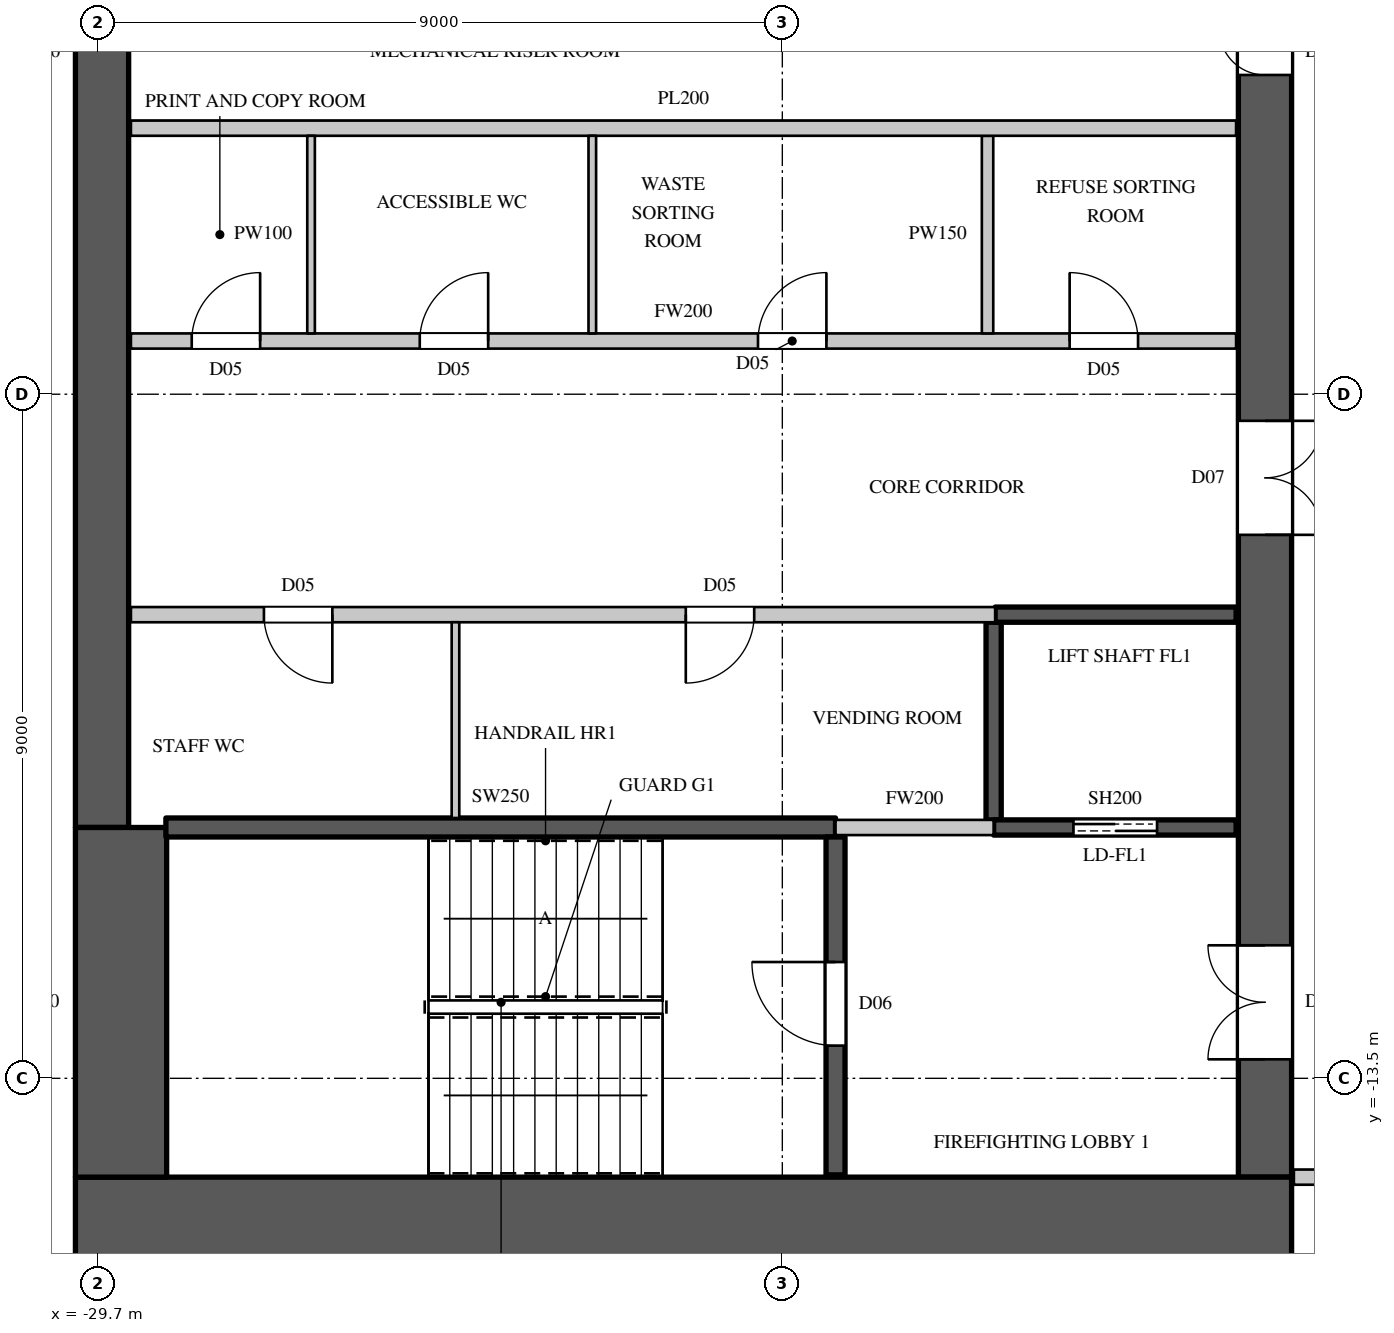
"""IFC4 building model, lengths in metres.
Left out: names, types, materials, properties, quantities, classifications, styles, units other than length and angle.
Written with IfcOpenShell. Run it as: python <this file> out.ifc"""

import sys

from ifc_helpers import new_model, si_unit, direction, frame, frame_2d, origin, place, context, subcontext, project, spatial, rectangle, extrude, element, fill, save


model = new_model("IFC4")
c1 = context("Model", 3, precision=1e-05, world=origin(), true_north=direction((0.0, 1.0)))
c2 = subcontext(c1, "Body", "Model", "MODEL_VIEW")
j1 = project(units=[si_unit("LENGTHUNIT", "METRE"), si_unit("PLANEANGLEUNIT", "RADIAN")], contexts=[c1])
p1 = place(None, origin())
s1 = spatial("IfcSite", under=j1, at=p1, CompositionType="ELEMENT")
p2 = place(p1, origin())
s2 = spatial("IfcBuilding", under=s1, at=p2, CompositionType="ELEMENT")
p3 = place(p2, frame((0.0, 0.0, 276.2)))
s3 = spatial("IfcBuildingStorey", under=s2, at=p3, CompositionType="ELEMENT", Elevation=276.2)
p4 = place(p3, frame((-30.0, -15.4, 0.0), z_axis=(0.0, 0.0, 1.0), x_axis=(1.0, 0.0, 0.0)))
e1 = element("IfcWall", 1, at=p4, inside=s3, PredefinedType="SHEAR", context=c2, shape_type="SweptSolid", body=[
    extrude(rectangle(XDim=16.0, YDim=1.2, at=frame_2d((8.0, 0.0))), origin(), (0.0, 0.0, 1.0), 4.1),
])
p5 = place(p3, frame((-14.35, -14.8, 0.0), z_axis=(0.0, 0.0, 1.0), x_axis=(0.0, 1.0, 0.0)))
e2 = element("IfcWall", 2, at=p5, inside=s3, PredefinedType="SHEAR", context=c2, shape_type="SweptSolid", body=[
    extrude(rectangle(XDim=29.6, YDim=0.7, at=frame_2d((14.8, 0.0))), origin(), (0.0, 0.0, 1.0), 4.1),
])
p6 = place(p5, frame((1.55, 0.0, 0.0)))
e3 = element("IfcOpeningElement", 3, at=p6, cuts=e2, PredefinedType="OPENING", context=c2, shape_type="SweptSolid", body=[
    extrude(rectangle(XDim=1.5, YDim=2.4, at=frame_2d((0.75, 1.2))), frame((0.0, 0.36, 0.0), z_axis=(0.0, -1.0, 0.0), x_axis=(1.0, 0.0, 0.0)), (0.0, 0.0, 1.0), 0.72),
])
p7 = place(p5, frame((26.55, 0.0, 0.0)))
e4 = element("IfcOpeningElement", 4, at=p7, cuts=e2, PredefinedType="OPENING", context=c2, shape_type="SweptSolid", body=[
    extrude(rectangle(XDim=1.5, YDim=2.4, at=frame_2d((0.75, 1.2))), frame((0.0, 0.36, 0.0), z_axis=(0.0, -1.0, 0.0), x_axis=(1.0, 0.0, 0.0)), (0.0, 0.0, 1.0), 0.72),
])
p8 = place(p5, frame((8.45, 0.0, 0.0)))
e5 = element("IfcOpeningElement", 5, at=p8, cuts=e2, PredefinedType="OPENING", context=c2, shape_type="SweptSolid", body=[
    extrude(rectangle(XDim=1.5, YDim=2.4, at=frame_2d((0.75, 1.2))), frame((0.0, 0.36, 0.0), z_axis=(0.0, -1.0, 0.0), x_axis=(1.0, 0.0, 0.0)), (0.0, 0.0, 1.0), 0.72),
])
p9 = place(p5, frame((19.65, 0.0, 0.0)))
e6 = element("IfcOpeningElement", 6, at=p9, cuts=e2, PredefinedType="OPENING", context=c2, shape_type="SweptSolid", body=[
    extrude(rectangle(XDim=1.5, YDim=2.4, at=frame_2d((0.75, 1.2))), frame((0.0, 0.36, 0.0), z_axis=(0.0, -1.0, 0.0), x_axis=(1.0, 0.0, 0.0)), (0.0, 0.0, 1.0), 0.72),
])
p10 = place(p5, frame((14.5, 0.0, 0.0)))
e7 = element("IfcOpeningElement", 7, at=p10, cuts=e2, PredefinedType="OPENING", context=c2, shape_type="SweptSolid", body=[
    extrude(rectangle(XDim=0.6, YDim=2.0, at=frame_2d((0.3, 1.0))), frame((0.0, 0.36, 0.0), z_axis=(0.0, -1.0, 0.0), x_axis=(1.0, 0.0, 0.0)), (0.0, 0.0, 1.0), 0.72),
])
p11 = place(p3, frame((-29.65, -10.2, 0.0), z_axis=(0.0, 0.0, 1.0), x_axis=(0.0, 1.0, 0.0)))
e8 = element("IfcWall", 8, at=p11, inside=s3, PredefinedType="SHEAR", context=c2, shape_type="SweptSolid", body=[
    extrude(rectangle(XDim=20.4, YDim=0.7, at=frame_2d((10.2, 0.0))), origin(), (0.0, 0.0, 1.0), 4.1),
])
p12 = place(p3, frame((-29.4, -14.8, 0.0), z_axis=(0.0, 0.0, 1.0), x_axis=(0.0, 1.0, 0.0)))
e9 = element("IfcWall", 9, at=p12, inside=s3, PredefinedType="SHEAR", context=c2, shape_type="SweptSolid", body=[
    extrude(rectangle(XDim=4.6, YDim=1.2, at=frame_2d((2.3, 0.0))), origin(), (0.0, 0.0, 1.0), 4.1),
])
p13 = place(p3, frame((-29.27, -7.4, 0.0), z_axis=(0.0, 0.0, 1.0), x_axis=(1.0, 0.0, 0.0)))
e10 = element("IfcWall", 10, at=p13, inside=s3, PredefinedType="PARTITIONING", context=c2, shape_type="SweptSolid", body=[
    extrude(rectangle(XDim=11.37, YDim=0.2, at=frame_2d((5.685, 0.0))), origin(), (0.0, 0.0, 1.0), 3.8),
])
p14 = place(p13, frame((1.75, 0.0, 0.0)))
e11 = element("IfcOpeningElement", 11, at=p14, cuts=e10, PredefinedType="OPENING", context=c2, shape_type="SweptSolid", body=[
    extrude(rectangle(XDim=0.9, YDim=2.2, at=frame_2d((0.45, 1.1))), frame((0.0, 0.11, 0.0), z_axis=(0.0, -1.0, 0.0), x_axis=(1.0, 0.0, 0.0)), (0.0, 0.0, 1.0), 0.22),
])
p15 = place(p13, frame((7.3, 0.0, 0.0)))
e12 = element("IfcOpeningElement", 12, at=p15, cuts=e10, PredefinedType="OPENING", context=c2, shape_type="SweptSolid", body=[
    extrude(rectangle(XDim=0.9, YDim=2.2, at=frame_2d((0.45, 1.1))), frame((0.0, 0.11, 0.0), z_axis=(0.0, -1.0, 0.0), x_axis=(1.0, 0.0, 0.0)), (0.0, 0.0, 1.0), 0.22),
])
p16 = place(p3, frame((-29.27, -3.8, 0.0), z_axis=(0.0, 0.0, 1.0), x_axis=(1.0, 0.0, 0.0)))
e13 = element("IfcWall", 13, at=p16, inside=s3, PredefinedType="PARTITIONING", context=c2, shape_type="SweptSolid", body=[
    extrude(rectangle(XDim=14.54, YDim=0.2, at=frame_2d((7.27, 0.0))), origin(), (0.0, 0.0, 1.0), 3.8),
])
p17 = place(p16, frame((0.8, 0.0, 0.0)))
e14 = element("IfcOpeningElement", 14, at=p17, cuts=e13, PredefinedType="OPENING", context=c2, shape_type="SweptSolid", body=[
    extrude(rectangle(XDim=0.9, YDim=2.2, at=frame_2d((0.45, 1.1))), frame((0.0, 0.11, 0.0), z_axis=(0.0, -1.0, 0.0), x_axis=(1.0, 0.0, 0.0)), (0.0, 0.0, 1.0), 0.22),
])
p18 = place(p16, frame((3.8, 0.0, 0.0)))
e15 = element("IfcOpeningElement", 15, at=p18, cuts=e13, PredefinedType="OPENING", context=c2, shape_type="SweptSolid", body=[
    extrude(rectangle(XDim=0.9, YDim=2.2, at=frame_2d((0.45, 1.1))), frame((0.0, 0.11, 0.0), z_axis=(0.0, -1.0, 0.0), x_axis=(1.0, 0.0, 0.0)), (0.0, 0.0, 1.0), 0.22),
])
p19 = place(p16, frame((8.25, 0.0, 0.0)))
e16 = element("IfcOpeningElement", 16, at=p19, cuts=e13, PredefinedType="OPENING", context=c2, shape_type="SweptSolid", body=[
    extrude(rectangle(XDim=0.9, YDim=2.2, at=frame_2d((0.45, 1.1))), frame((0.0, 0.11, 0.0), z_axis=(0.0, -1.0, 0.0), x_axis=(1.0, 0.0, 0.0)), (0.0, 0.0, 1.0), 0.22),
])
p20 = place(p16, frame((12.35, 0.0, 0.0)))
e17 = element("IfcOpeningElement", 17, at=p20, cuts=e13, PredefinedType="OPENING", context=c2, shape_type="SweptSolid", body=[
    extrude(rectangle(XDim=0.9, YDim=2.2, at=frame_2d((0.45, 1.1))), frame((0.0, 0.11, 0.0), z_axis=(0.0, -1.0, 0.0), x_axis=(1.0, 0.0, 0.0)), (0.0, 0.0, 1.0), 0.22),
])
p21 = place(p3, frame((-20.0, -10.2, 0.0), z_axis=(0.0, 0.0, 1.0), x_axis=(1.0, 0.0, 0.0)))
e18 = element("IfcWall", 18, at=p21, inside=s3, PredefinedType="PARTITIONING", context=c2, shape_type="SweptSolid", body=[
    extrude(rectangle(XDim=2.08, YDim=0.2, at=frame_2d((1.04, 0.0))), origin(), (0.0, 0.0, 1.0), 3.8),
])
p22 = place(p3, frame((-13.97, -14.8, 0.0), z_axis=(0.0, 0.0, 1.0), x_axis=(1.0, 0.0, 0.0)))
e19 = element("IfcWall", 19, at=p22, inside=s3, PredefinedType="PARTITIONING", context=c2, shape_type="SweptSolid", body=[
    extrude(rectangle(XDim=2.87, YDim=0.2, at=frame_2d((1.435, 0.0))), origin(), (0.0, 0.0, 1.0), 3.8),
])
p23 = place(p3, frame((-18.0, -3.7, 0.0), z_axis=(0.0, 0.0, 1.0), x_axis=(0.0, 1.0, 0.0)))
e20 = element("IfcWall", 20, at=p23, inside=s3, PredefinedType="PARTITIONING", context=c2, shape_type="SweptSolid", body=[
    extrude(rectangle(XDim=2.6, YDim=0.15, at=frame_2d((1.3, 0.0))), origin(), (0.0, 0.0, 1.0), 3.8),
])
p24 = place(p3, frame((-29.27, -1.0, 0.0), z_axis=(0.0, 0.0, 1.0), x_axis=(1.0, 0.0, 0.0)))
e21 = element("IfcWall", 21, at=p24, inside=s3, PredefinedType="PARTITIONING", context=c2, shape_type="SweptSolid", body=[
    extrude(rectangle(XDim=14.54, YDim=0.2, at=frame_2d((7.27, 0.0))), origin(), (0.0, 0.0, 1.0), 3.8),
])
p25 = place(p3, frame((-17.92, -10.1, 0.0), z_axis=(0.0, 0.0, 1.0), x_axis=(0.0, 1.0, 0.0)))
e22 = element("IfcWall", 22, at=p25, inside=s3, PredefinedType="SHEAR", context=c2, shape_type="SweptSolid", body=[
    extrude(rectangle(XDim=2.6, YDim=0.2, at=frame_2d((1.3, 0.0))), origin(), (0.0, 0.0, 1.0), 3.8),
])
p26 = place(p3, frame((-17.92, -10.2, 0.0), z_axis=(0.0, 0.0, 1.0), x_axis=(1.0, 0.0, 0.0)))
e23 = element("IfcWall", 23, at=p26, inside=s3, PredefinedType="SHEAR", context=c2, shape_type="SweptSolid", body=[
    extrude(rectangle(XDim=3.19, YDim=0.2, at=frame_2d((1.595, 0.0))), origin(), (0.0, 0.0, 1.0), 3.8),
])
p27 = place(p26, frame((1.05, 0.0, 0.0)))
e24 = element("IfcOpeningElement", 24, at=p27, cuts=e23, PredefinedType="OPENING", context=c2, shape_type="SweptSolid", body=[
    extrude(rectangle(XDim=1.1, YDim=2.2, at=frame_2d((0.55, 1.1))), frame((0.0, 0.11, 0.0), z_axis=(0.0, -1.0, 0.0), x_axis=(1.0, 0.0, 0.0)), (0.0, 0.0, 1.0), 0.22),
])
p28 = place(p3, frame((-17.9, -7.4, 0.0), z_axis=(0.0, 0.0, 1.0), x_axis=(1.0, 0.0, 0.0)))
e25 = element("IfcWall", 25, at=p28, inside=s3, PredefinedType="SHEAR", context=c2, shape_type="SweptSolid", body=[
    extrude(rectangle(XDim=3.17, YDim=0.2, at=frame_2d((1.585, 0.0))), origin(), (0.0, 0.0, 1.0), 3.8),
])
p29 = place(p3, frame((-28.81, -10.2, 0.0), z_axis=(0.0, 0.0, 1.0), x_axis=(1.0, 0.0, 0.0)))
e26 = element("IfcWall", 26, at=p29, inside=s3, PredefinedType="SHEAR", context=c2, shape_type="SweptSolid", body=[
    extrude(rectangle(XDim=8.81, YDim=0.25, at=frame_2d((4.405, 0.0))), origin(), (0.0, 0.0, 1.0), 3.8),
])
p30 = place(p3, frame((-20.0, -14.77, 0.0), z_axis=(0.0, 0.0, 1.0), x_axis=(0.0, 1.0, 0.0)))
e27 = element("IfcWall", 27, at=p30, inside=s3, PredefinedType="SHEAR", context=c2, shape_type="SweptSolid", body=[
    extrude(rectangle(XDim=4.445, YDim=0.25, at=frame_2d((2.223, 0.0))), origin(), (0.0, 0.0, 1.0), 3.8),
])
p31 = place(p30, frame((1.7, 0.0, 0.0)))
e28 = element("IfcOpeningElement", 28, at=p31, cuts=e27, PredefinedType="OPENING", context=c2, shape_type="SweptSolid", body=[
    extrude(rectangle(XDim=1.1, YDim=2.2, at=frame_2d((0.55, 1.1))), frame((0.0, 0.135, 0.0), z_axis=(0.0, -1.0, 0.0), x_axis=(1.0, 0.0, 0.0)), (0.0, 0.0, 1.0), 0.27),
])
p32 = place(p3, frame((-26.9, -3.7, 0.0), z_axis=(0.0, 0.0, 1.0), x_axis=(0.0, 1.0, 0.0)))
e29 = element("IfcWall", 29, at=p32, inside=s3, PredefinedType="PARTITIONING", context=c2, shape_type="SweptSolid", body=[
    extrude(rectangle(XDim=2.6, YDim=0.1, at=frame_2d((1.3, 0.0))), origin(), (0.0, 0.0, 1.0), 3.8),
])
p33 = place(p3, frame((-25.0, -10.075, 0.0), z_axis=(0.0, 0.0, 1.0), x_axis=(0.0, 1.0, 0.0)))
e30 = element("IfcWall", 30, at=p33, inside=s3, PredefinedType="PARTITIONING", context=c2, shape_type="SweptSolid", body=[
    extrude(rectangle(XDim=2.575, YDim=0.1, at=frame_2d((1.288, 0.0))), origin(), (0.0, 0.0, 1.0), 3.8),
])
p34 = place(p3, frame((-23.2, -3.7, 0.0), z_axis=(0.0, 0.0, 1.0), x_axis=(0.0, 1.0, 0.0)))
e31 = element("IfcWall", 31, at=p34, inside=s3, PredefinedType="PARTITIONING", context=c2, shape_type="SweptSolid", body=[
    extrude(rectangle(XDim=2.6, YDim=0.1, at=frame_2d((1.3, 0.0))), origin(), (0.0, 0.0, 1.0), 3.8),
])
p35 = place(p31, origin())
e32 = element("IfcDoor", 32, at=p35, inside=s3, OperationType="SINGLE_SWING_RIGHT", PredefinedType="DOOR", context=c2, shape_type="SweptSolid", body=[
    extrude(rectangle(XDim=1.1, YDim=2.2, at=frame_2d((0.55, 1.1))), frame((0.0, 0.025, 0.0), z_axis=(0.0, -1.0, 0.0), x_axis=(1.0, 0.0, 0.0)), (0.0, 0.0, 1.0), 0.05),
])
fill(e28, e32)
p36 = place(p14, origin())
e33 = element("IfcDoor", 33, at=p36, inside=s3, OperationType="SINGLE_SWING_LEFT", PredefinedType="DOOR", context=c2, shape_type="SweptSolid", body=[
    extrude(rectangle(XDim=0.9, YDim=2.2, at=frame_2d((0.45, 1.1))), frame((0.0, 0.025, 0.0), z_axis=(0.0, -1.0, 0.0), x_axis=(1.0, 0.0, 0.0)), (0.0, 0.0, 1.0), 0.05),
])
fill(e11, e33)
p37 = place(p15, origin())
e34 = element("IfcDoor", 34, at=p37, inside=s3, OperationType="SINGLE_SWING_RIGHT", PredefinedType="DOOR", context=c2, shape_type="SweptSolid", body=[
    extrude(rectangle(XDim=0.9, YDim=2.2, at=frame_2d((0.45, 1.1))), frame((0.0, 0.025, 0.0), z_axis=(0.0, -1.0, 0.0), x_axis=(1.0, 0.0, 0.0)), (0.0, 0.0, 1.0), 0.05),
])
fill(e12, e34)
p38 = place(p17, origin())
e35 = element("IfcDoor", 35, at=p38, inside=s3, OperationType="SINGLE_SWING_RIGHT", PredefinedType="DOOR", context=c2, shape_type="SweptSolid", body=[
    extrude(rectangle(XDim=0.9, YDim=2.2, at=frame_2d((0.45, 1.1))), frame((0.0, 0.025, 0.0), z_axis=(0.0, -1.0, 0.0), x_axis=(1.0, 0.0, 0.0)), (0.0, 0.0, 1.0), 0.05),
])
fill(e14, e35)
p39 = place(p18, origin())
e36 = element("IfcDoor", 36, at=p39, inside=s3, OperationType="SINGLE_SWING_RIGHT", PredefinedType="DOOR", context=c2, shape_type="SweptSolid", body=[
    extrude(rectangle(XDim=0.9, YDim=2.2, at=frame_2d((0.45, 1.1))), frame((0.0, 0.025, 0.0), z_axis=(0.0, -1.0, 0.0), x_axis=(1.0, 0.0, 0.0)), (0.0, 0.0, 1.0), 0.05),
])
fill(e15, e36)
p40 = place(p19, origin())
e37 = element("IfcDoor", 37, at=p40, inside=s3, OperationType="SINGLE_SWING_RIGHT", PredefinedType="DOOR", context=c2, shape_type="SweptSolid", body=[
    extrude(rectangle(XDim=0.9, YDim=2.2, at=frame_2d((0.45, 1.1))), frame((0.0, 0.025, 0.0), z_axis=(0.0, -1.0, 0.0), x_axis=(1.0, 0.0, 0.0)), (0.0, 0.0, 1.0), 0.05),
])
fill(e16, e37)
p41 = place(p20, origin())
e38 = element("IfcDoor", 38, at=p41, inside=s3, OperationType="SINGLE_SWING_LEFT", PredefinedType="DOOR", context=c2, shape_type="SweptSolid", body=[
    extrude(rectangle(XDim=0.9, YDim=2.2, at=frame_2d((0.45, 1.1))), frame((0.0, 0.025, 0.0), z_axis=(0.0, -1.0, 0.0), x_axis=(1.0, 0.0, 0.0)), (0.0, 0.0, 1.0), 0.05),
])
fill(e17, e38)
p42 = place(p27, origin())
e39 = element("IfcDoor", 39, at=p42, inside=s3, OperationType="DOUBLE_DOOR_SLIDING", PredefinedType="DOOR", context=c2, shape_type="SweptSolid", body=[
    extrude(rectangle(XDim=1.1, YDim=2.2, at=frame_2d((0.55, 1.1))), frame((0.0, 0.025, 0.0), z_axis=(0.0, -1.0, 0.0), x_axis=(1.0, 0.0, 0.0)), (0.0, 0.0, 1.0), 0.05),
])
fill(e24, e39)
p43 = place(p6, origin())
e40 = element("IfcDoor", 40, at=p43, inside=s3, OperationType="DOUBLE_DOOR_SINGLE_SWING", PredefinedType="DOOR", context=c2, shape_type="SweptSolid", body=[
    extrude(rectangle(XDim=1.5, YDim=2.4, at=frame_2d((0.75, 1.2))), frame((0.0, 0.345, 0.0), z_axis=(0.0, -1.0, 0.0), x_axis=(1.0, 0.0, 0.0)), (0.0, 0.0, 1.0), 0.05),
])
fill(e3, e40)
p44 = place(p8, origin())
e41 = element("IfcDoor", 41, at=p44, inside=s3, OperationType="DOUBLE_DOOR_SINGLE_SWING", PredefinedType="DOOR", context=c2, shape_type="SweptSolid", body=[
    extrude(rectangle(XDim=1.5, YDim=2.4, at=frame_2d((0.75, 1.2))), frame((0.0, -0.295, 0.0), z_axis=(0.0, -1.0, 0.0), x_axis=(1.0, 0.0, 0.0)), (0.0, 0.0, 1.0), 0.05),
])
fill(e5, e41)
p45 = place(p10, origin())
e42 = element("IfcDoor", 42, at=p45, inside=s3, OperationType="SINGLE_SWING_RIGHT", PredefinedType="DOOR", context=c2, shape_type="SweptSolid", body=[
    extrude(rectangle(XDim=0.6, YDim=2.0, at=frame_2d((0.3, 1.0))), frame((0.0, 0.345, 0.0), z_axis=(0.0, -1.0, 0.0), x_axis=(1.0, 0.0, 0.0)), (0.0, 0.0, 1.0), 0.05),
])
fill(e7, e42)
save(model, sys.argv[1])
